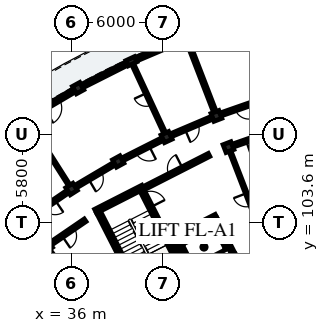
"""IFC4 building model, lengths in metres.
Left out: names, types, materials, properties, quantities, classifications, styles, units other than length and angle.
Written with IfcOpenShell. Run it as: python <this file> out.ifc"""

import sys

from ifc_helpers import new_model, si_unit, direction, frame, frame_2d, origin, origin_2d, place, context, subcontext, project, spatial, rectangle, extrude, element, fill, save


model = new_model("IFC4")
c1 = context("Model", 3, precision=1e-05, world=origin(), true_north=direction((0.0, 1.0)))
c2 = subcontext(c1, "Body", "Model", "MODEL_VIEW")
j1 = project(units=[si_unit("LENGTHUNIT", "METRE"), si_unit("PLANEANGLEUNIT", "RADIAN")], contexts=[c1])
p1 = place(None, origin())
s1 = spatial("IfcSite", under=j1, at=p1, CompositionType="ELEMENT")
p2 = place(p1, origin())
s2 = spatial("IfcBuilding", under=s1, at=p2, CompositionType="ELEMENT")
p3 = place(p2, frame((0.0, 0.0, 12.2)))
s3 = spatial("IfcBuildingStorey", under=s2, at=p3, CompositionType="ELEMENT", Elevation=12.2)
p4 = place(p3, frame((37.773, 104.296, 0.0), z_axis=(0.0, 0.0, 1.0), x_axis=(0.453992276384, -0.891005618941, 0.0)))
e1 = element("IfcWall", 1, at=p4, inside=s3, PredefinedType="SHEAR", context=c2, shape_type="SweptSolid", body=[
    extrude(rectangle(XDim=6.6, YDim=0.28, at=frame_2d((3.3, 0.0))), origin(), (0.0, 0.0, 1.0), 3.11),
])
p5 = place(p3, frame((37.585, 104.357, 0.0), z_axis=(0.0, 0.0, 1.0), x_axis=(0.891020222667, 0.453963613958, 0.0)))
e2 = element("IfcWall", 2, at=p5, inside=s3, PredefinedType="SHEAR", context=c2, shape_type="SweptSolid", body=[
    extrude(rectangle(XDim=3.48, YDim=0.28, at=frame_2d((1.74, 0.0))), origin(), (0.0, 0.0, 1.0), 3.11),
])
p6 = place(p3, frame((40.625, 105.748, 0.0), z_axis=(0.0, 0.0, 1.0), x_axis=(0.453992276384, -0.891005618941, 0.0)))
e3 = element("IfcWall", 3, at=p6, inside=s3, PredefinedType="SHEAR", context=c2, shape_type="SweptSolid", body=[
    extrude(rectangle(XDim=6.6, YDim=0.28, at=frame_2d((3.3, 0.0))), origin(), (0.0, 0.0, 1.0), 3.11),
])
p7 = place(p6, frame((0.22, 0.0, 0.0)))
e4 = element("IfcOpeningElement", 4, at=p7, cuts=e3, PredefinedType="OPENING", context=c2, shape_type="SweptSolid", body=[
    extrude(rectangle(XDim=1.05, YDim=2.15, at=frame_2d((0.525, 1.075))), frame((0.0, 0.15, 0.0), z_axis=(0.0, -1.0, 0.0), x_axis=(1.0, 0.0, 0.0)), (0.0, 0.0, 1.0), 0.3),
])
p8 = place(p3, frame((42.597, 102.561, 0.0), z_axis=(0.0, 0.0, 1.0), x_axis=(0.891001200497, 0.454000947921, 0.0)))
e5 = element("IfcWall", 5, at=p8, inside=s3, PredefinedType="SHEAR", context=c2, shape_type="SweptSolid", body=[
    extrude(rectangle(XDim=3.26, YDim=0.23, at=frame_2d((1.63, 0.0))), origin(), (0.0, 0.0, 1.0), 3.11),
])
p9 = place(p8, frame((0.9, 0.0, 0.0)))
e6 = element("IfcOpeningElement", 6, at=p9, cuts=e5, PredefinedType="OPENING", context=c2, shape_type="SweptSolid", body=[
    extrude(rectangle(XDim=1.1, YDim=2.15, at=frame_2d((0.55, 1.075))), frame((0.0, 0.125, 0.0), z_axis=(0.0, -1.0, 0.0), x_axis=(1.0, 0.0, 0.0)), (0.0, 0.0, 1.0), 0.25),
])
for number, where, z_axis, x_axis in (
    (7, (42.751, 102.511, 0.0), (0.0, 0.0, 1.0), (0.454, -0.891, 0.0)),
    (8, (45.451, 103.886, 0.0), (0.0, 0.0, 1.0), (0.454, -0.891, 0.0)),
):
    element("IfcWall", number, at=place(p3, frame(where, z_axis=z_axis, x_axis=x_axis)), inside=s3, PredefinedType="SHEAR", context=c2, shape_type="SweptSolid", body=[
        extrude(rectangle(XDim=2.7, YDim=0.23, at=frame_2d((1.35, 0.0))), origin(), (0.0, 0.0, 1.0), 3.11),
    ])
for number, where, z_axis, x_axis in (
    (9, (46.325, 108.57, 0.0), (0.0, 0.0, 1.0), (-0.36, 0.933, 0.0)),
    (10, (45.532, 110.622, 0.0), (0.0, 0.0, 1.0), (-0.36, 0.933, 0.0)),
    (11, (42.252, 109.23, 0.0), (0.0, 0.0, 1.0), (-0.421, 0.907, 0.0)),
):
    element("IfcColumn", number, at=place(p3, frame(where, z_axis=z_axis, x_axis=x_axis)), inside=s3, PredefinedType="COLUMN", context=c2, shape_type="SweptSolid", body=[
        extrude(rectangle(XDim=0.55, YDim=0.55, at=origin_2d()), origin(), (0.0, 0.0, 1.0), 3.105),
    ])
p10 = place(p3, frame((39.938, 114.219, 0.0), z_axis=(0.0, 0.0, 1.0), x_axis=(-0.420859924104, 0.907125638643, 0.0)))
e12 = element("IfcColumn", 12, at=p10, inside=s3, PredefinedType="PILASTER", context=c2, shape_type="SweptSolid", body=[
    extrude(rectangle(XDim=0.38, YDim=0.62, at=origin_2d()), origin(), (0.0, 0.0, 1.0), 3.105),
])
for number, where, z_axis, x_axis in (
    (13, (39.072, 107.625, 0.0), (0.0, 0.0, 1.0), (-0.48, 0.877, 0.0)),
    (14, (36.433, 112.451, 0.0), (0.0, 0.0, 1.0), (-0.48, 0.877, 0.0)),
    (15, (36.003, 105.813, 0.0), (0.0, 0.0, 1.0), (-0.536, 0.844, 0.0)),
    (16, (34.361, 102.029, 0.0), (0.0, 0.0, 1.0), (-0.591, 0.807, 0.0)),
):
    element("IfcColumn", number, at=place(p3, frame(where, z_axis=z_axis, x_axis=x_axis)), inside=s3, PredefinedType="COLUMN", context=c2, shape_type="SweptSolid", body=[
        extrude(rectangle(XDim=0.55, YDim=0.55, at=origin_2d()), origin(), (0.0, 0.0, 1.0), 3.105),
    ])
p11 = place(p3, frame((43.326, 115.657, 0.0), z_axis=(0.0, 0.0, 1.0), x_axis=(-0.920502438884, -0.390736816807, 0.0)))
e17 = element("IfcWall", 17, at=p11, inside=s3, PredefinedType="SOLIDWALL", context=c2, shape_type="SweptSolid", body=[
    extrude(rectangle(XDim=3.521, YDim=0.245, at=frame_2d((1.76, 0.0))), origin(), (0.0, 0.0, 1.0), 2.355),
])
p12 = place(p11, frame((1.17, 0.0, 0.55)))
e18 = element("IfcOpeningElement", 18, at=p12, cuts=e17, PredefinedType="OPENING", context=c2, shape_type="SweptSolid", body=[
    extrude(rectangle(XDim=1.18, YDim=1.48, at=frame_2d((0.59, 0.74))), frame((0.0, 0.133, 0.0), z_axis=(0.0, -1.0, 0.0), x_axis=(1.0, 0.0, 0.0)), (0.0, 0.0, 1.0), 0.265),
])
p13 = place(p3, frame((39.795, 114.147, 0.0), z_axis=(0.0, 0.0, 1.0), x_axis=(-0.892756700232, -0.450539092855, 0.0)))
e19 = element("IfcWall", 19, at=p13, inside=s3, PredefinedType="SOLIDWALL", context=c2, shape_type="SweptSolid", body=[
    extrude(rectangle(XDim=3.521, YDim=0.245, at=frame_2d((1.76, 0.0))), origin(), (0.0, 0.0, 1.0), 2.355),
])
p14 = place(p13, frame((1.02, 0.0, 0.55)))
e20 = element("IfcOpeningElement", 20, at=p14, cuts=e19, PredefinedType="OPENING", context=c2, shape_type="SweptSolid", body=[
    extrude(rectangle(XDim=1.48, YDim=1.62, at=frame_2d((0.74, 0.81))), frame((0.0, 0.133, 0.0), z_axis=(0.0, -1.0, 0.0), x_axis=(1.0, 0.0, 0.0)), (0.0, 0.0, 1.0), 0.265),
])
p15 = place(p3, frame((36.222, 112.326, 0.0), z_axis=(0.0, 0.0, 1.0), x_axis=(-0.861154218161, -0.50834379365, 0.0)))
e21 = element("IfcWall", 21, at=p15, inside=s3, PredefinedType="SOLIDWALL", context=c2, shape_type="SweptSolid", body=[
    extrude(rectangle(XDim=3.521, YDim=0.245, at=frame_2d((1.76, 0.0))), origin(), (0.0, 0.0, 1.0), 2.355),
])
p16 = place(p15, frame((1.19, 0.0, 0.0)))
e22 = element("IfcOpeningElement", 22, at=p16, cuts=e21, PredefinedType="OPENING", context=c2, shape_type="SweptSolid", body=[
    extrude(rectangle(XDim=1.14, YDim=2.16, at=frame_2d((0.57, 1.08))), frame((0.0, 0.133, 0.0), z_axis=(0.0, -1.0, 0.0), x_axis=(1.0, 0.0, 0.0)), (0.0, 0.0, 1.0), 0.265),
])
p17 = place(p3, frame((40.682, 105.834, 0.0), z_axis=(0.0, 0.0, 1.0), x_axis=(0.891003372311, 0.453996685595, 0.0)))
e23 = element("IfcWall", 23, at=p17, inside=s3, PredefinedType="PARTITIONING", context=c2, shape_type="SweptSolid", body=[
    extrude(rectangle(XDim=4.9, YDim=0.22, at=frame_2d((2.45, 0.0))), origin(), (0.0, 0.0, 1.0), 2.34),
])
p18 = place(p17, frame((1.95, 0.0, 0.0)))
e24 = element("IfcOpeningElement", 24, at=p18, cuts=e23, PredefinedType="OPENING", context=c2, shape_type="SweptSolid", body=[
    extrude(rectangle(XDim=1.0, YDim=2.15, at=frame_2d((0.5, 1.075))), frame((0.0, 0.12, 0.0), z_axis=(0.0, -1.0, 0.0), x_axis=(1.0, 0.0, 0.0)), (0.0, 0.0, 1.0), 0.24),
])
p19 = place(p3, frame((48.566, 111.68, 0.0), z_axis=(0.0, 0.0, 1.0), x_axis=(-0.944253820929, -0.329218349522, 0.0)))
e25 = element("IfcWall", 25, at=p19, inside=s3, PredefinedType="PARTITIONING", context=c2, shape_type="SweptSolid", body=[
    extrude(rectangle(XDim=2.863, YDim=0.205, at=frame_2d((1.432, 0.0))), origin(), (0.0, 0.0, 1.0), 2.37),
])
p20 = place(p19, frame((0.957, 0.0, 0.0)))
e26 = element("IfcOpeningElement", 26, at=p20, cuts=e25, PredefinedType="OPENING", context=c2, shape_type="SweptSolid", body=[
    extrude(rectangle(XDim=0.95, YDim=2.13, at=frame_2d((0.475, 1.065))), frame((0.0, 0.113, 0.0), z_axis=(0.0, -1.0, 0.0), x_axis=(1.0, 0.0, 0.0)), (0.0, 0.0, 1.0), 0.225),
])
p21 = place(p3, frame((49.222, 109.58, 0.0), z_axis=(0.0, 0.0, 1.0), x_axis=(-0.944265123647, -0.329185929627, 0.0)))
e27 = element("IfcWall", 27, at=p21, inside=s3, PredefinedType="PARTITIONING", context=c2, shape_type="SweptSolid", body=[
    extrude(rectangle(XDim=2.718, YDim=0.205, at=frame_2d((1.359, 0.0))), origin(), (0.0, 0.0, 1.0), 2.37),
])
p22 = place(p21, frame((0.884, 0.0, 0.0)))
e28 = element("IfcOpeningElement", 28, at=p22, cuts=e27, PredefinedType="OPENING", context=c2, shape_type="SweptSolid", body=[
    extrude(rectangle(XDim=0.95, YDim=2.13, at=frame_2d((0.475, 1.065))), frame((0.0, 0.113, 0.0), z_axis=(0.0, -1.0, 0.0), x_axis=(1.0, 0.0, 0.0)), (0.0, 0.0, 1.0), 0.225),
])
p23 = place(p3, frame((45.388, 110.996, 0.0), z_axis=(0.0, 0.0, 1.0), x_axis=(-0.360186633854, 0.932880264982, 0.0)))
e29 = element("IfcWall", 29, at=p23, inside=s3, PredefinedType="PARTITIONING", context=c2, shape_type="SweptSolid", body=[
    extrude(rectangle(XDim=4.7, YDim=0.185, at=frame_2d((2.35, 0.0))), origin(), (0.0, 0.0, 1.0), 2.37),
])
p24 = place(p3, frame((48.846, 102.04, 0.0), z_axis=(0.0, 0.0, 1.0), x_axis=(-0.360183473608, 0.932881485152, 0.0)))
e30 = element("IfcWall", 30, at=p24, inside=s3, PredefinedType="PARTITIONING", context=c2, shape_type="SweptSolid", body=[
    extrude(rectangle(XDim=6.6, YDim=0.125, at=frame_2d((3.3, 0.0))), origin(), (0.0, 0.0, 1.0), 2.37),
])
p25 = place(p24, frame((2.855, 0.0, 0.0)))
e31 = element("IfcOpeningElement", 31, at=p25, cuts=e30, PredefinedType="OPENING", context=c2, shape_type="SweptSolid", body=[
    extrude(rectangle(XDim=0.89, YDim=2.1, at=frame_2d((0.445, 1.05))), frame((0.0, 0.073, 0.0), z_axis=(0.0, -1.0, 0.0), x_axis=(1.0, 0.0, 0.0)), (0.0, 0.0, 1.0), 0.145),
])
p26 = place(p3, frame((45.21, 110.486, 0.0), z_axis=(0.0, 0.0, 1.0), x_axis=(-0.920511160294, -0.390716270168, 0.0)))
e32 = element("IfcWall", 32, at=p26, inside=s3, PredefinedType="PARTITIONING", context=c2, shape_type="SweptSolid", body=[
    extrude(rectangle(XDim=2.863, YDim=0.205, at=frame_2d((1.432, 0.0))), origin(), (0.0, 0.0, 1.0), 2.37),
])
p27 = place(p26, frame((0.967, 0.0, 0.0)))
e33 = element("IfcOpeningElement", 33, at=p27, cuts=e32, PredefinedType="OPENING", context=c2, shape_type="SweptSolid", body=[
    extrude(rectangle(XDim=0.93, YDim=2.12, at=frame_2d((0.465, 1.06))), frame((0.0, 0.113, 0.0), z_axis=(0.0, -1.0, 0.0), x_axis=(1.0, 0.0, 0.0)), (0.0, 0.0, 1.0), 0.225),
])
p28 = place(p3, frame((42.084, 109.593, 0.0), z_axis=(0.0, 0.0, 1.0), x_axis=(-0.420862519045, 0.907124434718, 0.0)))
e34 = element("IfcWall", 34, at=p28, inside=s3, PredefinedType="PLUMBINGWALL", context=c2, shape_type="SweptSolid", body=[
    extrude(rectangle(XDim=4.7, YDim=0.14, at=frame_2d((2.35, 0.0))), origin(), (0.0, 0.0, 1.0), 2.37),
])
p29 = place(p28, frame((1.92, 0.0, 0.0)))
e35 = element("IfcOpeningElement", 35, at=p29, cuts=e34, PredefinedType="OPENING", context=c2, shape_type="SweptSolid", body=[
    extrude(rectangle(XDim=0.86, YDim=2.06, at=frame_2d((0.43, 1.03))), frame((0.0, 0.08, 0.0), z_axis=(0.0, -1.0, 0.0), x_axis=(1.0, 0.0, 0.0)), (0.0, 0.0, 1.0), 0.16),
])
p30 = place(p3, frame((41.94, 109.073, 0.0), z_axis=(0.0, 0.0, 1.0), x_axis=(-0.89273239336, -0.450587254419, 0.0)))
e36 = element("IfcWall", 36, at=p30, inside=s3, PredefinedType="PARTITIONING", context=c2, shape_type="SweptSolid", body=[
    extrude(rectangle(XDim=2.863, YDim=0.205, at=frame_2d((1.432, 0.0))), origin(), (0.0, 0.0, 1.0), 2.37),
])
p31 = place(p30, frame((0.937, 0.0, 0.0)))
e37 = element("IfcOpeningElement", 37, at=p31, cuts=e36, PredefinedType="OPENING", context=c2, shape_type="SweptSolid", body=[
    extrude(rectangle(XDim=0.99, YDim=2.16, at=frame_2d((0.495, 1.08))), frame((0.0, 0.113, 0.0), z_axis=(0.0, -1.0, 0.0), x_axis=(1.0, 0.0, 0.0)), (0.0, 0.0, 1.0), 0.225),
])
p32 = place(p3, frame((38.77, 107.447, 0.0), z_axis=(0.0, 0.0, 1.0), x_axis=(-0.861113214678, -0.508413248753, 0.0)))
e38 = element("IfcWall", 38, at=p32, inside=s3, PredefinedType="PARTITIONING", context=c2, shape_type="SweptSolid", body=[
    extrude(rectangle(XDim=2.863, YDim=0.205, at=frame_2d((1.432, 0.0))), origin(), (0.0, 0.0, 1.0), 2.37),
])
p33 = place(p32, frame((0.947, 0.0, 0.0)))
e39 = element("IfcOpeningElement", 39, at=p33, cuts=e38, PredefinedType="OPENING", context=c2, shape_type="SweptSolid", body=[
    extrude(rectangle(XDim=0.97, YDim=2.15, at=frame_2d((0.485, 1.075))), frame((0.0, 0.113, 0.0), z_axis=(0.0, -1.0, 0.0), x_axis=(1.0, 0.0, 0.0)), (0.0, 0.0, 1.0), 0.225),
])
p34 = place(p3, frame((35.789, 106.151, 0.0), z_axis=(0.0, 0.0, 1.0), x_axis=(-0.536492262982, 0.843905238614, 0.0)))
e40 = element("IfcWall", 40, at=p34, inside=s3, PredefinedType="PARTITIONING", context=c2, shape_type="SweptSolid", body=[
    extrude(rectangle(XDim=4.7, YDim=0.115, at=frame_2d((2.35, 0.0))), origin(), (0.0, 0.0, 1.0), 2.37),
])
p35 = place(p34, frame((1.895, 0.0, 0.0)))
e41 = element("IfcOpeningElement", 41, at=p35, cuts=e40, PredefinedType="OPENING", context=c2, shape_type="SweptSolid", body=[
    extrude(rectangle(XDim=0.91, YDim=2.1, at=frame_2d((0.455, 1.05))), frame((0.0, 0.067, 0.0), z_axis=(0.0, -1.0, 0.0), x_axis=(1.0, 0.0, 0.0)), (0.0, 0.0, 1.0), 0.135),
])
p36 = place(p3, frame((35.714, 105.616, 0.0), z_axis=(0.0, 0.0, 1.0), x_axis=(-0.825779671787, -0.563992848947, 0.0)))
e42 = element("IfcWall", 42, at=p36, inside=s3, PredefinedType="PARTITIONING", context=c2, shape_type="SweptSolid", body=[
    extrude(rectangle(XDim=2.863, YDim=0.205, at=frame_2d((1.432, 0.0))), origin(), (0.0, 0.0, 1.0), 2.37),
])
p37 = place(p36, frame((0.957, 0.0, 0.0)))
e43 = element("IfcOpeningElement", 43, at=p37, cuts=e42, PredefinedType="OPENING", context=c2, shape_type="SweptSolid", body=[
    extrude(rectangle(XDim=0.95, YDim=2.13, at=frame_2d((0.475, 1.065))), frame((0.0, 0.113, 0.0), z_axis=(0.0, -1.0, 0.0), x_axis=(1.0, 0.0, 0.0)), (0.0, 0.0, 1.0), 0.225),
])
p38 = place(p3, frame((36.895, 103.76, 0.0), z_axis=(0.0, 0.0, 1.0), x_axis=(-0.825752009056, -0.56403334967, 0.0)))
e44 = element("IfcWall", 44, at=p38, inside=s3, PredefinedType="PARTITIONING", context=c2, shape_type="SweptSolid", body=[
    extrude(rectangle(XDim=2.718, YDim=0.205, at=frame_2d((1.359, 0.0))), origin(), (0.0, 0.0, 1.0), 2.37),
])
p39 = place(p38, frame((0.884, 0.0, 0.0)))
e45 = element("IfcOpeningElement", 45, at=p39, cuts=e44, PredefinedType="OPENING", context=c2, shape_type="SweptSolid", body=[
    extrude(rectangle(XDim=0.95, YDim=2.13, at=frame_2d((0.475, 1.065))), frame((0.0, 0.113, 0.0), z_axis=(0.0, -1.0, 0.0), x_axis=(1.0, 0.0, 0.0)), (0.0, 0.0, 1.0), 0.225),
])
p40 = place(p3, frame((38.497, 96.382, 0.0), z_axis=(0.0, 0.0, 1.0), x_axis=(-0.590924179316, 0.806727100263, 0.0)))
e46 = element("IfcWall", 46, at=p40, inside=s3, PredefinedType="PARTITIONING", context=c2, shape_type="SweptSolid", body=[
    extrude(rectangle(XDim=6.6, YDim=0.125, at=frame_2d((3.3, 0.0))), origin(), (0.0, 0.0, 1.0), 2.37),
])
p41 = place(p40, frame((2.865, 0.0, 0.0)))
e47 = element("IfcOpeningElement", 47, at=p41, cuts=e46, PredefinedType="OPENING", context=c2, shape_type="SweptSolid", body=[
    extrude(rectangle(XDim=0.87, YDim=2.08, at=frame_2d((0.435, 1.04))), frame((0.0, 0.073, 0.0), z_axis=(0.0, -1.0, 0.0), x_axis=(1.0, 0.0, 0.0)), (0.0, 0.0, 1.0), 0.145),
])
p42 = place(p12, origin())
e48 = element("IfcWindow", 48, at=p42, inside=s3, PartitioningType="SINGLE_PANEL", PredefinedType="WINDOW", context=c2, shape_type="SweptSolid", body=[
    extrude(rectangle(XDim=1.18, YDim=1.48, at=frame_2d((0.59, 0.74))), frame((0.0, 0.03, 0.0), z_axis=(0.0, -1.0, 0.0), x_axis=(1.0, 0.0, 0.0)), (0.0, 0.0, 1.0), 0.06),
])
fill(e18, e48)
p43 = place(p14, origin())
e49 = element("IfcWindow", 49, at=p43, inside=s3, PartitioningType="SINGLE_PANEL", PredefinedType="WINDOW", context=c2, shape_type="SweptSolid", body=[
    extrude(rectangle(XDim=1.48, YDim=1.62, at=frame_2d((0.74, 0.81))), frame((0.0, 0.03, 0.0), z_axis=(0.0, -1.0, 0.0), x_axis=(1.0, 0.0, 0.0)), (0.0, 0.0, 1.0), 0.06),
])
fill(e20, e49)
p44 = place(p16, origin())
e50 = element("IfcDoor", 50, at=p44, inside=s3, OperationType="SINGLE_SWING_RIGHT", PredefinedType="DOOR", context=c2, shape_type="SweptSolid", body=[
    extrude(rectangle(XDim=1.14, YDim=2.16, at=frame_2d((0.57, 1.08))), frame((0.0, 0.025, 0.0), z_axis=(0.0, -1.0, 0.0), x_axis=(1.0, 0.0, 0.0)), (0.0, 0.0, 1.0), 0.05),
])
fill(e22, e50)
p45 = place(p7, origin())
e51 = element("IfcDoor", 51, at=p45, inside=s3, OperationType="SINGLE_SWING_RIGHT", PredefinedType="DOOR", context=c2, shape_type="SweptSolid", body=[
    extrude(rectangle(XDim=1.05, YDim=2.15, at=frame_2d((0.525, 1.075))), frame((0.0, 0.025, 0.0), z_axis=(0.0, -1.0, 0.0), x_axis=(1.0, 0.0, 0.0)), (0.0, 0.0, 1.0), 0.05),
])
fill(e4, e51)
p46 = place(p9, origin())
e52 = element("IfcDoor", 52, at=p46, inside=s3, OperationType="DOUBLE_DOOR_SLIDING", PredefinedType="DOOR", context=c2, shape_type="SweptSolid", body=[
    extrude(rectangle(XDim=1.1, YDim=2.15, at=frame_2d((0.55, 1.075))), frame((0.0, 0.025, 0.0), z_axis=(0.0, -1.0, 0.0), x_axis=(1.0, 0.0, 0.0)), (0.0, 0.0, 1.0), 0.05),
])
fill(e6, e52)
p47 = place(p18, origin())
e53 = element("IfcDoor", 53, at=p47, inside=s3, OperationType="SINGLE_SWING_RIGHT", PredefinedType="DOOR", context=c2, shape_type="SweptSolid", body=[
    extrude(rectangle(XDim=1.0, YDim=2.15, at=frame_2d((0.5, 1.075))), frame((0.0, 0.025, 0.0), z_axis=(0.0, -1.0, 0.0), x_axis=(1.0, 0.0, 0.0)), (0.0, 0.0, 1.0), 0.05),
])
fill(e24, e53)
p48 = place(p20, origin())
e54 = element("IfcDoor", 54, at=p48, inside=s3, OperationType="SINGLE_SWING_LEFT", PredefinedType="DOOR", context=c2, shape_type="SweptSolid", body=[
    extrude(rectangle(XDim=0.95, YDim=2.13, at=frame_2d((0.475, 1.065))), frame((0.0, 0.025, 0.0), z_axis=(0.0, -1.0, 0.0), x_axis=(1.0, 0.0, 0.0)), (0.0, 0.0, 1.0), 0.05),
])
fill(e26, e54)
p49 = place(p22, origin())
e55 = element("IfcDoor", 55, at=p49, inside=s3, OperationType="SINGLE_SWING_RIGHT", PredefinedType="DOOR", context=c2, shape_type="SweptSolid", body=[
    extrude(rectangle(XDim=0.95, YDim=2.13, at=frame_2d((0.475, 1.065))), frame((0.0, 0.025, 0.0), z_axis=(0.0, -1.0, 0.0), x_axis=(1.0, 0.0, 0.0)), (0.0, 0.0, 1.0), 0.05),
])
fill(e28, e55)
p50 = place(p25, origin())
e56 = element("IfcDoor", 56, at=p50, inside=s3, OperationType="SINGLE_SWING_RIGHT", PredefinedType="DOOR", context=c2, shape_type="SweptSolid", body=[
    extrude(rectangle(XDim=0.89, YDim=2.1, at=frame_2d((0.445, 1.05))), frame((0.0, 0.025, 0.0), z_axis=(0.0, -1.0, 0.0), x_axis=(1.0, 0.0, 0.0)), (0.0, 0.0, 1.0), 0.05),
])
fill(e31, e56)
p51 = place(p27, origin())
e57 = element("IfcDoor", 57, at=p51, inside=s3, OperationType="SINGLE_SWING_RIGHT", PredefinedType="DOOR", context=c2, shape_type="SweptSolid", body=[
    extrude(rectangle(XDim=0.93, YDim=2.12, at=frame_2d((0.465, 1.06))), frame((0.0, 0.025, 0.0), z_axis=(0.0, -1.0, 0.0), x_axis=(1.0, 0.0, 0.0)), (0.0, 0.0, 1.0), 0.05),
])
fill(e33, e57)
p52 = place(p29, origin())
e58 = element("IfcDoor", 58, at=p52, inside=s3, OperationType="SINGLE_SWING_RIGHT", PredefinedType="DOOR", context=c2, shape_type="SweptSolid", body=[
    extrude(rectangle(XDim=0.86, YDim=2.06, at=frame_2d((0.43, 1.03))), frame((0.0, 0.025, 0.0), z_axis=(0.0, -1.0, 0.0), x_axis=(1.0, 0.0, 0.0)), (0.0, 0.0, 1.0), 0.05),
])
fill(e35, e58)
p53 = place(p31, origin())
e59 = element("IfcDoor", 59, at=p53, inside=s3, OperationType="SINGLE_SWING_LEFT", PredefinedType="DOOR", context=c2, shape_type="SweptSolid", body=[
    extrude(rectangle(XDim=0.99, YDim=2.16, at=frame_2d((0.495, 1.08))), frame((0.0, 0.025, 0.0), z_axis=(0.0, -1.0, 0.0), x_axis=(1.0, 0.0, 0.0)), (0.0, 0.0, 1.0), 0.05),
])
fill(e37, e59)
p54 = place(p33, origin())
e60 = element("IfcDoor", 60, at=p54, inside=s3, OperationType="SINGLE_SWING_RIGHT", PredefinedType="DOOR", context=c2, shape_type="SweptSolid", body=[
    extrude(rectangle(XDim=0.97, YDim=2.15, at=frame_2d((0.485, 1.075))), frame((0.0, 0.025, 0.0), z_axis=(0.0, -1.0, 0.0), x_axis=(1.0, 0.0, 0.0)), (0.0, 0.0, 1.0), 0.05),
])
fill(e39, e60)
p55 = place(p35, origin())
e61 = element("IfcDoor", 61, at=p55, inside=s3, OperationType="SINGLE_SWING_RIGHT", PredefinedType="DOOR", context=c2, shape_type="SweptSolid", body=[
    extrude(rectangle(XDim=0.91, YDim=2.1, at=frame_2d((0.455, 1.05))), frame((0.0, 0.025, 0.0), z_axis=(0.0, -1.0, 0.0), x_axis=(1.0, 0.0, 0.0)), (0.0, 0.0, 1.0), 0.05),
])
fill(e41, e61)
p56 = place(p37, origin())
e62 = element("IfcDoor", 62, at=p56, inside=s3, OperationType="SINGLE_SWING_LEFT", PredefinedType="DOOR", context=c2, shape_type="SweptSolid", body=[
    extrude(rectangle(XDim=0.95, YDim=2.13, at=frame_2d((0.475, 1.065))), frame((0.0, 0.025, 0.0), z_axis=(0.0, -1.0, 0.0), x_axis=(1.0, 0.0, 0.0)), (0.0, 0.0, 1.0), 0.05),
])
fill(e43, e62)
p57 = place(p39, origin())
e63 = element("IfcDoor", 63, at=p57, inside=s3, OperationType="SINGLE_SWING_RIGHT", PredefinedType="DOOR", context=c2, shape_type="SweptSolid", body=[
    extrude(rectangle(XDim=0.95, YDim=2.13, at=frame_2d((0.475, 1.065))), frame((0.0, 0.025, 0.0), z_axis=(0.0, -1.0, 0.0), x_axis=(1.0, 0.0, 0.0)), (0.0, 0.0, 1.0), 0.05),
])
fill(e45, e63)
save(model, sys.argv[1])
